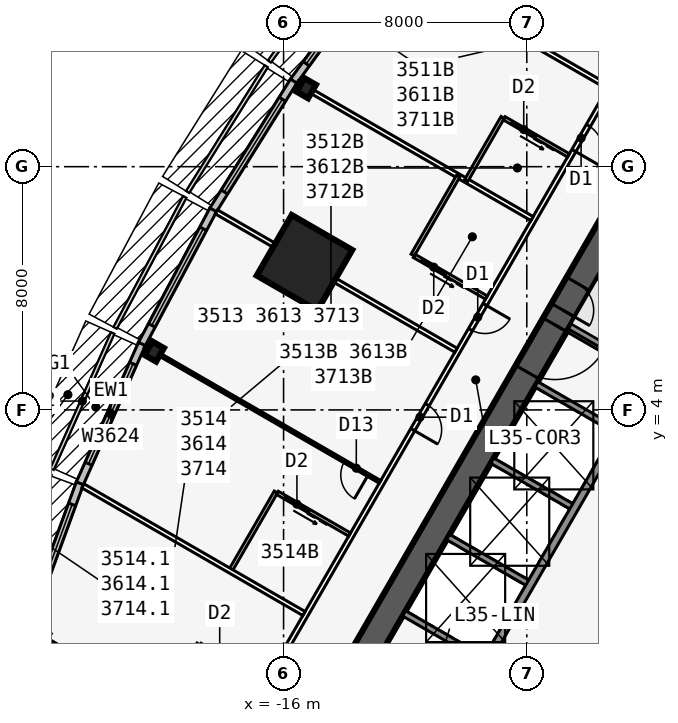
"""IFC4 building model, lengths in metres.
Left out: names, types, materials, properties, quantities, classifications, styles, units other than length and angle.
Written with IfcOpenShell. Run it as: python <this file> out.ifc"""

import sys

from ifc_helpers import new_model, si_unit, direction, frame, frame_2d, origin, origin_2d, place, context, subcontext, project, spatial, rectangle, i_section, extrude, element, fill, save


model = new_model("IFC4")
c1 = context("Model", 3, precision=1e-05, world=origin(), true_north=direction((0.0, 1.0)))
c2 = subcontext(c1, "Body", "Model", "MODEL_VIEW")
j1 = project(units=[si_unit("LENGTHUNIT", "METRE"), si_unit("PLANEANGLEUNIT", "RADIAN")], contexts=[c1])
p1 = place(None, origin())
s1 = spatial("IfcSite", under=j1, at=p1, CompositionType="ELEMENT")
p2 = place(p1, origin())
s2 = spatial("IfcBuilding", under=s1, at=p2, CompositionType="ELEMENT")
p3 = place(p2, frame((0.0, 0.0, 135.1)))
s3 = spatial("IfcBuildingStorey", under=s2, at=p3, CompositionType="ELEMENT", Elevation=135.1)
p4 = place(p3, frame((0.0, 19.052, 0.0), z_axis=(0.0, 0.0, 1.0), x_axis=(-0.499999749417, -0.866025548458, 0.0)))
e1 = element("IfcWall", 1, at=p4, inside=s3, PredefinedType="SHEAR", context=c2, shape_type="SweptSolid", body=[
    extrude(rectangle(XDim=33.0, YDim=0.9, at=frame_2d((16.5, 0.0))), origin(), (0.0, 0.0, 1.0), 3.4),
])
p5 = place(p4, frame((14.15, 0.0, 0.0)))
e2 = element("IfcOpeningElement", 2, at=p5, cuts=e1, PredefinedType="OPENING", context=c2, shape_type="SweptSolid", body=[
    extrude(rectangle(XDim=1.8, YDim=2.13, at=frame_2d((0.9, 1.065))), frame((0.0, 0.46, 0.0), z_axis=(0.0, -1.0, 0.0), x_axis=(1.0, 0.0, 0.0)), (0.0, 0.0, 1.0), 0.92),
])
p6 = place(p4, frame((12.6, 0.0, 0.0)))
e3 = element("IfcOpeningElement", 3, at=p6, cuts=e1, PredefinedType="OPENING", context=c2, shape_type="SweptSolid", body=[
    extrude(rectangle(XDim=1.0, YDim=2.13, at=frame_2d((0.5, 1.065))), frame((0.0, 0.46, 0.0), z_axis=(0.0, -1.0, 0.0), x_axis=(1.0, 0.0, 0.0)), (0.0, 0.0, 1.0), 0.92),
])
p7 = place(p3, frame((-4.929, 3.365, 0.0), z_axis=(0.0, 0.0, 1.0), x_axis=(-0.499991433582, -0.866030349552, 0.0)))
e4 = element("IfcWall", 4, at=p7, inside=s3, PredefinedType="SOLIDWALL", context=c2, shape_type="SweptSolid", body=[
    extrude(rectangle(XDim=10.633, YDim=0.25, at=frame_2d((5.316, 0.0))), origin(), (0.0, 0.0, 1.0), 3.235),
])
p8 = place(p7, frame((9.164, 0.0, 0.0)))
e5 = element("IfcOpeningElement", 5, at=p8, cuts=e4, PredefinedType="OPENING", context=c2, shape_type="SweptSolid", body=[
    extrude(rectangle(XDim=0.9, YDim=2.13, at=frame_2d((0.45, 1.065))), frame((0.0, 0.135, 0.0), z_axis=(0.0, -1.0, 0.0), x_axis=(1.0, 0.0, 0.0)), (0.0, 0.0, 1.0), 0.27),
])
for number, where, z_axis, x_axis in (
    (6, (-3.879, 5.184, 0.0), (0.0, 0.0, 1.0), (-0.866, 0.5, 0.0)),
    (7, (-4.979, 3.279, 0.0), (0.0, 0.0, 1.0), (-0.866, 0.5, 0.0)),
    (8, (-6.429, 0.767, 0.0), (0.0, 0.0, 1.0), (-0.866, 0.5, 0.0)),
    (9, (-7.879, -1.744, 0.0), (0.0, 0.0, 1.0), (-0.866, 0.5, 0.0)),
    (10, (-9.329, -4.256, 0.0), (0.0, 0.0, 1.0), (-0.866, 0.5, 0.0)),
):
    element("IfcWall", number, at=place(p3, frame(where, z_axis=z_axis, x_axis=x_axis)), inside=s3, PredefinedType="SOLIDWALL", context=c2, shape_type="SweptSolid", body=[
        extrude(rectangle(XDim=3.125, YDim=0.2, at=frame_2d((1.562, 0.0))), origin(), (0.0, 0.0, 1.0), 3.235),
    ])
for number, where, z_axis, x_axis in (
    (11, (-15.254, 14.58, 0.0), (0.0, 0.0, 1.0), (-0.866, 0.5, 0.0)),
    (12, (-20.254, 5.92, 0.0), (0.0, 0.0, 1.0), (-0.866, 0.5, 0.0)),
):
    element("IfcColumn", number, at=place(p3, frame(where, z_axis=z_axis, x_axis=x_axis)), inside=s3, PredefinedType="COLUMN", context=c2, shape_type="SweptSolid", body=[
        extrude(i_section(OverallWidth=0.437, OverallDepth=0.513, WebThickness=0.061, FlangeThickness=0.097, at=origin_2d()), origin(), (0.0, 0.0, 1.0), 3.4),
    ])
p9 = place(p3, frame((-15.312, 8.84, 0.0), z_axis=(0.0, 0.0, 1.0), x_axis=(-0.866025403784, 0.5, 0.0)))
e13 = element("IfcColumn", 13, at=p9, inside=s3, PredefinedType="COLUMN", context=c2, shape_type="SweptSolid", body=[
    extrude(rectangle(XDim=2.3, YDim=2.3, at=origin_2d()), origin(), (0.0, 0.0, 1.0), 3.4),
])
p10 = place(p3, frame((-12.718, 18.875, 0.0), z_axis=(0.0, 0.0, 1.0), x_axis=(-0.587669188412, -0.809101307001, 0.0)))
e14 = element("IfcWall", 14, at=p10, inside=s3, PredefinedType="STANDARD", context=c2, shape_type="SweptSolid", body=[
    extrude(rectangle(XDim=5.028, YDim=0.25, at=frame_2d((2.514, 0.0))), origin(), (0.0, 0.0, 1.0), 3.235),
])
p11 = place(p10, frame((0.714, 0.0, 0.45)))
e15 = element("IfcOpeningElement", 15, at=p11, cuts=e14, PredefinedType="OPENING", context=c2, shape_type="SweptSolid", body=[
    extrude(rectangle(XDim=3.6, YDim=2.4, at=frame_2d((1.8, 1.2))), frame((0.0, 0.135, 0.0), z_axis=(0.0, -1.0, 0.0), x_axis=(1.0, 0.0, 0.0)), (0.0, 0.0, 1.0), 0.27),
])
p12 = place(p3, frame((-15.667, 14.814, 0.0), z_axis=(0.0, 0.0, 1.0), x_axis=(-0.529990167382, -0.84800378683, 0.0)))
e16 = element("IfcWall", 16, at=p12, inside=s3, PredefinedType="STANDARD", context=c2, shape_type="SweptSolid", body=[
    extrude(rectangle(XDim=5.003, YDim=0.25, at=frame_2d((2.501, 0.0))), origin(), (0.0, 0.0, 1.0), 3.235),
])
p13 = place(p12, frame((0.701, 0.0, 0.45)))
e17 = element("IfcOpeningElement", 17, at=p13, cuts=e16, PredefinedType="OPENING", context=c2, shape_type="SweptSolid", body=[
    extrude(rectangle(XDim=3.6, YDim=2.4, at=frame_2d((1.8, 1.2))), frame((0.0, 0.135, 0.0), z_axis=(0.0, -1.0, 0.0), x_axis=(1.0, 0.0, 0.0)), (0.0, 0.0, 1.0), 0.27),
])
p14 = place(p3, frame((-18.314, 10.579, 0.0), z_axis=(0.0, 0.0, 1.0), x_axis=(-0.469404966864, -0.882982999317, 0.0)))
e18 = element("IfcWall", 18, at=p14, inside=s3, PredefinedType="STANDARD", context=c2, shape_type="SweptSolid", body=[
    extrude(rectangle(XDim=5.003, YDim=0.25, at=frame_2d((2.501, 0.0))), origin(), (0.0, 0.0, 1.0), 3.235),
])
p15 = place(p14, frame((0.701, 0.0, 0.45)))
e19 = element("IfcOpeningElement", 19, at=p15, cuts=e18, PredefinedType="OPENING", context=c2, shape_type="SweptSolid", body=[
    extrude(rectangle(XDim=3.6, YDim=2.4, at=frame_2d((1.8, 1.2))), frame((0.0, 0.135, 0.0), z_axis=(0.0, -1.0, 0.0), x_axis=(1.0, 0.0, 0.0)), (0.0, 0.0, 1.0), 0.27),
])
p16 = place(p3, frame((-20.659, 6.169, 0.0), z_axis=(0.0, 0.0, 1.0), x_axis=(-0.406832200364, -0.913502906808, 0.0)))
e20 = element("IfcWall", 20, at=p16, inside=s3, PredefinedType="STANDARD", context=c2, shape_type="SweptSolid", body=[
    extrude(rectangle(XDim=5.028, YDim=0.25, at=frame_2d((2.514, 0.0))), origin(), (0.0, 0.0, 1.0), 3.235),
])
p17 = place(p16, frame((0.714, 0.0, 0.45)))
e21 = element("IfcOpeningElement", 21, at=p17, cuts=e20, PredefinedType="OPENING", context=c2, shape_type="SweptSolid", body=[
    extrude(rectangle(XDim=3.6, YDim=2.4, at=frame_2d((1.8, 1.2))), frame((0.0, 0.135, 0.0), z_axis=(0.0, -1.0, 0.0), x_axis=(1.0, 0.0, 0.0)), (0.0, 0.0, 1.0), 0.27),
])
p18 = place(p3, frame((-22.701, 1.584, 0.0), z_axis=(0.0, 0.0, 1.0), x_axis=(-0.343225593282, -0.939252996863, 0.0)))
e22 = element("IfcWall", 22, at=p18, inside=s3, PredefinedType="STANDARD", context=c2, shape_type="SweptSolid", body=[
    extrude(rectangle(XDim=5.076, YDim=0.25, at=frame_2d((2.538, 0.0))), origin(), (0.0, 0.0, 1.0), 3.235),
])
p19 = place(p18, frame((0.738, 0.0, 0.45)))
e23 = element("IfcOpeningElement", 23, at=p19, cuts=e22, PredefinedType="OPENING", context=c2, shape_type="SweptSolid", body=[
    extrude(rectangle(XDim=3.6, YDim=2.4, at=frame_2d((1.8, 1.2))), frame((0.0, 0.135, 0.0), z_axis=(0.0, -1.0, 0.0), x_axis=(1.0, 0.0, 0.0)), (0.0, 0.0, 1.0), 0.27),
])
p20 = place(p3, frame((-0.5, 22.836, 0.0), z_axis=(0.0, 0.0, 1.0), x_axis=(-0.500001677587, -0.866024435227, 0.0)))
e24 = element("IfcWall", 24, at=p20, inside=s3, PredefinedType="PARTITIONING", context=c2, shape_type="SweptSolid", body=[
    extrude(rectangle(XDim=39.054, YDim=0.15, at=frame_2d((19.527, 0.0))), origin(), (0.0, 0.0, 1.0), 3.235),
])
p21 = place(p20, frame((1.558, 0.0, 0.0)))
e25 = element("IfcOpeningElement", 25, at=p21, cuts=e24, PredefinedType="OPENING", context=c2, shape_type="SweptSolid", body=[
    extrude(rectangle(XDim=0.95, YDim=2.13, at=frame_2d((0.475, 1.065))), frame((0.0, 0.085, 0.0), z_axis=(0.0, -1.0, 0.0), x_axis=(1.0, 0.0, 0.0)), (0.0, 0.0, 1.0), 0.17),
])
p22 = place(p20, frame((10.952, 0.0, 0.0)))
e26 = element("IfcOpeningElement", 26, at=p22, cuts=e24, PredefinedType="OPENING", context=c2, shape_type="SweptSolid", body=[
    extrude(rectangle(XDim=0.95, YDim=2.13, at=frame_2d((0.475, 1.065))), frame((0.0, 0.085, 0.0), z_axis=(0.0, -1.0, 0.0), x_axis=(1.0, 0.0, 0.0)), (0.0, 0.0, 1.0), 0.17),
])
p23 = place(p20, frame((17.752, 0.0, 0.0)))
e27 = element("IfcOpeningElement", 27, at=p23, cuts=e24, PredefinedType="OPENING", context=c2, shape_type="SweptSolid", body=[
    extrude(rectangle(XDim=0.95, YDim=2.13, at=frame_2d((0.475, 1.065))), frame((0.0, 0.085, 0.0), z_axis=(0.0, -1.0, 0.0), x_axis=(1.0, 0.0, 0.0)), (0.0, 0.0, 1.0), 0.17),
])
p24 = place(p20, frame((21.552, 0.0, 0.0)))
e28 = element("IfcOpeningElement", 28, at=p24, cuts=e24, PredefinedType="OPENING", context=c2, shape_type="SweptSolid", body=[
    extrude(rectangle(XDim=0.95, YDim=2.13, at=frame_2d((0.475, 1.065))), frame((0.0, 0.085, 0.0), z_axis=(0.0, -1.0, 0.0), x_axis=(1.0, 0.0, 0.0)), (0.0, 0.0, 1.0), 0.17),
])
p25 = place(p20, frame((30.952, 0.0, 0.0)))
e29 = element("IfcOpeningElement", 29, at=p25, cuts=e24, PredefinedType="OPENING", context=c2, shape_type="SweptSolid", body=[
    extrude(rectangle(XDim=0.95, YDim=2.13, at=frame_2d((0.475, 1.065))), frame((0.0, 0.085, 0.0), z_axis=(0.0, -1.0, 0.0), x_axis=(1.0, 0.0, 0.0)), (0.0, 0.0, 1.0), 0.17),
])
p26 = place(p20, frame((37.752, 0.0, 0.0)))
e30 = element("IfcOpeningElement", 30, at=p26, cuts=e24, PredefinedType="OPENING", context=c2, shape_type="SweptSolid", body=[
    extrude(rectangle(XDim=0.95, YDim=2.13, at=frame_2d((0.475, 1.065))), frame((0.0, 0.085, 0.0), z_axis=(0.0, -1.0, 0.0), x_axis=(1.0, 0.0, 0.0)), (0.0, 0.0, 1.0), 0.17),
])
p27 = place(p3, frame((-5.329, 14.623, 0.0), z_axis=(0.0, 0.0, 1.0), x_axis=(-0.866011723728, 0.500023693804, 0.0)))
e31 = element("IfcWall", 31, at=p27, inside=s3, PredefinedType="PARTITIONING", context=c2, shape_type="SweptSolid", body=[
    extrude(rectangle(XDim=8.395, YDim=0.15, at=frame_2d((4.198, 0.0))), origin(), (0.0, 0.0, 1.0), 2.389),
])
p28 = place(p3, frame((-7.829, 10.293, 0.0), z_axis=(0.0, 0.0, 1.0), x_axis=(-0.866027015393, 0.499997208602, 0.0)))
e32 = element("IfcWall", 32, at=p28, inside=s3, PredefinedType="PARTITIONING", context=c2, shape_type="SweptSolid", body=[
    extrude(rectangle(XDim=8.922, YDim=0.15, at=frame_2d((4.461, 0.0))), origin(), (0.0, 0.0, 1.0), 2.389),
])
p29 = place(p3, frame((-10.329, 5.963, 0.0), z_axis=(0.0, 0.0, 1.0), x_axis=(-0.866025170687, 0.500000403736, 0.0)))
e33 = element("IfcWall", 33, at=p29, inside=s3, PredefinedType="PARTITIONING", context=c2, shape_type="SweptSolid", body=[
    extrude(rectangle(XDim=9.099, YDim=0.15, at=frame_2d((4.549, 0.0))), origin(), (0.0, 0.0, 1.0), 2.389),
])
p30 = place(p3, frame((-12.829, 1.633, 0.0), z_axis=(0.0, 0.0, 1.0), x_axis=(-0.866027015393, 0.499997208602, 0.0)))
e34 = element("IfcWall", 34, at=p30, inside=s3, PredefinedType="PARTITIONING", context=c2, shape_type="SweptSolid", body=[
    extrude(rectangle(XDim=8.922, YDim=0.1, at=frame_2d((4.461, 0.0))), origin(), (0.0, 0.0, 1.0), 2.389),
])
p31 = place(p30, frame((0.45, 0.0, 0.0)))
e35 = element("IfcOpeningElement", 35, at=p31, cuts=e34, PredefinedType="OPENING", context=c2, shape_type="SweptSolid", body=[
    extrude(rectangle(XDim=0.9, YDim=2.13, at=frame_2d((0.45, 1.065))), frame((0.0, 0.06, 0.0), z_axis=(0.0, -1.0, 0.0), x_axis=(1.0, 0.0, 0.0)), (0.0, 0.0, 1.0), 0.12),
])
p32 = place(p3, frame((-15.329, -2.697, 0.0), z_axis=(0.0, 0.0, 1.0), x_axis=(-0.866024316602, 0.50000188305, 0.0)))
e36 = element("IfcWall", 36, at=p32, inside=s3, PredefinedType="PARTITIONING", context=c2, shape_type="SweptSolid", body=[
    extrude(rectangle(XDim=8.395, YDim=0.15, at=frame_2d((4.198, 0.0))), origin(), (0.0, 0.0, 1.0), 2.389),
])
p33 = place(p3, frame((-17.829, -7.027, 0.0), z_axis=(0.0, 0.0, 1.0), x_axis=(-0.866029804378, 0.499992377871, 0.0)))
e37 = element("IfcWall", 37, at=p33, inside=s3, PredefinedType="PARTITIONING", context=c2, shape_type="SweptSolid", body=[
    extrude(rectangle(XDim=7.516, YDim=0.15, at=frame_2d((3.758, 0.0))), origin(), (0.0, 0.0, 1.0), 2.389),
])
p34 = place(p3, frame((-8.793, 13.622, 0.0), z_axis=(0.0, 0.0, 1.0), x_axis=(-0.500001309137, -0.866024647952, 0.0)))
e38 = element("IfcWall", 38, at=p34, inside=s3, PredefinedType="PLUMBINGWALL", context=c2, shape_type="SweptSolid", body=[
    extrude(rectangle(XDim=2.4, YDim=0.12, at=frame_2d((1.2, 0.0))), origin(), (0.0, 0.0, 1.0), 3.235),
])
p35 = place(p3, frame((-6.628, 12.372, 0.0), z_axis=(0.0, 0.0, 1.0), x_axis=(-0.866005645448, 0.500034220881, 0.0)))
e39 = element("IfcWall", 39, at=p35, inside=s3, PredefinedType="PLUMBINGWALL", context=c2, shape_type="SweptSolid", body=[
    extrude(rectangle(XDim=2.44, YDim=0.12, at=frame_2d((1.22, 0.0))), origin(), (0.0, 0.0, 1.0), 3.235),
])
p36 = place(p35, frame((1.25, 0.0, 0.0)))
e40 = element("IfcOpeningElement", 40, at=p36, cuts=e39, PredefinedType="OPENING", context=c2, shape_type="SweptSolid", body=[
    extrude(rectangle(XDim=0.9, YDim=2.13, at=frame_2d((0.45, 1.065))), frame((0.0, 0.07, 0.0), z_axis=(0.0, -1.0, 0.0), x_axis=(1.0, 0.0, 0.0)), (0.0, 0.0, 1.0), 0.14),
])
p37 = place(p3, frame((-10.253, 11.693, 0.0), z_axis=(0.0, 0.0, 1.0), x_axis=(-0.499990139034, -0.866031096941, 0.0)))
e41 = element("IfcWall", 41, at=p37, inside=s3, PredefinedType="PLUMBINGWALL", context=c2, shape_type="SweptSolid", body=[
    extrude(rectangle(XDim=3.0, YDim=0.12, at=frame_2d((1.5, 0.0))), origin(), (0.0, 0.0, 1.0), 3.235),
])
p38 = place(p3, frame((-9.329, 7.695, 0.0), z_axis=(0.0, 0.0, 1.0), x_axis=(-0.866035715982, 0.499982138324, 0.0)))
e42 = element("IfcWall", 42, at=p38, inside=s3, PredefinedType="PLUMBINGWALL", context=c2, shape_type="SweptSolid", body=[
    extrude(rectangle(XDim=2.74, YDim=0.12, at=frame_2d((1.37, 0.0))), origin(), (0.0, 0.0, 1.0), 3.235),
])
p39 = place(p38, frame((1.55, 0.0, 0.0)))
e43 = element("IfcOpeningElement", 43, at=p39, cuts=e42, PredefinedType="OPENING", context=c2, shape_type="SweptSolid", body=[
    extrude(rectangle(XDim=0.9, YDim=2.13, at=frame_2d((0.45, 1.065))), frame((0.0, 0.07, 0.0), z_axis=(0.0, -1.0, 0.0), x_axis=(1.0, 0.0, 0.0)), (0.0, 0.0, 1.0), 0.14),
])
p40 = place(p3, frame((-16.253, 1.301, 0.0), z_axis=(0.0, 0.0, 1.0), x_axis=(-0.499990139034, -0.866031096941, 0.0)))
e44 = element("IfcWall", 44, at=p40, inside=s3, PredefinedType="PLUMBINGWALL", context=c2, shape_type="SweptSolid", body=[
    extrude(rectangle(XDim=3.0, YDim=0.12, at=frame_2d((1.5, 0.0))), origin(), (0.0, 0.0, 1.0), 3.235),
])
p41 = place(p3, frame((-13.829, -0.099, 0.0), z_axis=(0.0, 0.0, 1.0), x_axis=(-0.865997131366, 0.500048966069, 0.0)))
e45 = element("IfcWall", 45, at=p41, inside=s3, PredefinedType="PLUMBINGWALL", context=c2, shape_type="SweptSolid", body=[
    extrude(rectangle(XDim=2.74, YDim=0.12, at=frame_2d((1.37, 0.0))), origin(), (0.0, 0.0, 1.0), 3.235),
])
p42 = place(p41, frame((1.55, 0.0, 0.0)))
e46 = element("IfcOpeningElement", 46, at=p42, cuts=e45, PredefinedType="OPENING", context=c2, shape_type="SweptSolid", body=[
    extrude(rectangle(XDim=0.9, YDim=2.13, at=frame_2d((0.45, 1.065))), frame((0.0, 0.07, 0.0), z_axis=(0.0, -1.0, 0.0), x_axis=(1.0, 0.0, 0.0)), (0.0, 0.0, 1.0), 0.14),
])
p43 = place(p3, frame((-18.793, -3.699, 0.0), z_axis=(0.0, 0.0, 1.0), x_axis=(-0.500001309137, -0.866024647952, 0.0)))
e47 = element("IfcWall", 47, at=p43, inside=s3, PredefinedType="PLUMBINGWALL", context=c2, shape_type="SweptSolid", body=[
    extrude(rectangle(XDim=2.4, YDim=0.12, at=frame_2d((1.2, 0.0))), origin(), (0.0, 0.0, 1.0), 3.235),
])
p44 = place(p3, frame((-16.628, -4.949, 0.0), z_axis=(0.0, 0.0, 1.0), x_axis=(-0.866048967903, 0.499959183527, 0.0)))
e48 = element("IfcWall", 48, at=p44, inside=s3, PredefinedType="PLUMBINGWALL", context=c2, shape_type="SweptSolid", body=[
    extrude(rectangle(XDim=2.44, YDim=0.12, at=frame_2d((1.22, 0.0))), origin(), (0.0, 0.0, 1.0), 3.235),
])
p45 = place(p44, frame((1.25, 0.0, 0.0)))
e49 = element("IfcOpeningElement", 49, at=p45, cuts=e48, PredefinedType="OPENING", context=c2, shape_type="SweptSolid", body=[
    extrude(rectangle(XDim=0.9, YDim=2.13, at=frame_2d((0.45, 1.065))), frame((0.0, 0.07, 0.0), z_axis=(0.0, -1.0, 0.0), x_axis=(1.0, 0.0, 0.0)), (0.0, 0.0, 1.0), 0.14),
])
p46 = place(p11, origin())
e50 = element("IfcWindow", 50, at=p46, inside=s3, PartitioningType="SINGLE_PANEL", PredefinedType="WINDOW", context=c2, shape_type="SweptSolid", body=[
    extrude(rectangle(XDim=3.6, YDim=2.4, at=frame_2d((1.8, 1.2))), frame((0.0, 0.03, 0.0), z_axis=(0.0, -1.0, 0.0), x_axis=(1.0, 0.0, 0.0)), (0.0, 0.0, 1.0), 0.06),
])
fill(e15, e50)
p47 = place(p13, origin())
e51 = element("IfcWindow", 51, at=p47, inside=s3, PartitioningType="SINGLE_PANEL", PredefinedType="WINDOW", context=c2, shape_type="SweptSolid", body=[
    extrude(rectangle(XDim=3.6, YDim=2.4, at=frame_2d((1.8, 1.2))), frame((0.0, 0.03, 0.0), z_axis=(0.0, -1.0, 0.0), x_axis=(1.0, 0.0, 0.0)), (0.0, 0.0, 1.0), 0.06),
])
fill(e17, e51)
p48 = place(p15, origin())
e52 = element("IfcWindow", 52, at=p48, inside=s3, PartitioningType="SINGLE_PANEL", PredefinedType="WINDOW", context=c2, shape_type="SweptSolid", body=[
    extrude(rectangle(XDim=3.6, YDim=2.4, at=frame_2d((1.8, 1.2))), frame((0.0, 0.03, 0.0), z_axis=(0.0, -1.0, 0.0), x_axis=(1.0, 0.0, 0.0)), (0.0, 0.0, 1.0), 0.06),
])
fill(e19, e52)
p49 = place(p17, origin())
e53 = element("IfcWindow", 53, at=p49, inside=s3, PartitioningType="SINGLE_PANEL", PredefinedType="WINDOW", context=c2, shape_type="SweptSolid", body=[
    extrude(rectangle(XDim=3.6, YDim=2.4, at=frame_2d((1.8, 1.2))), frame((0.0, 0.03, 0.0), z_axis=(0.0, -1.0, 0.0), x_axis=(1.0, 0.0, 0.0)), (0.0, 0.0, 1.0), 0.06),
])
fill(e21, e53)
p50 = place(p19, origin())
e54 = element("IfcWindow", 54, at=p50, inside=s3, PartitioningType="SINGLE_PANEL", PredefinedType="WINDOW", context=c2, shape_type="SweptSolid", body=[
    extrude(rectangle(XDim=3.6, YDim=2.4, at=frame_2d((1.8, 1.2))), frame((0.0, 0.03, 0.0), z_axis=(0.0, -1.0, 0.0), x_axis=(1.0, 0.0, 0.0)), (0.0, 0.0, 1.0), 0.06),
])
fill(e23, e54)
p51 = place(p31, origin())
e55 = element("IfcDoor", 55, at=p51, inside=s3, OperationType="SINGLE_SWING_LEFT", PredefinedType="DOOR", context=c2, shape_type="SweptSolid", body=[
    extrude(rectangle(XDim=0.9, YDim=2.13, at=frame_2d((0.45, 1.065))), frame((0.0, 0.025, 0.0), z_axis=(0.0, -1.0, 0.0), x_axis=(1.0, 0.0, 0.0)), (0.0, 0.0, 1.0), 0.05),
])
fill(e35, e55)
p52 = place(p36, origin())
e56 = element("IfcDoor", 56, at=p52, inside=s3, OperationType="SLIDING_TO_LEFT", PredefinedType="DOOR", context=c2, shape_type="SweptSolid", body=[
    extrude(rectangle(XDim=0.9, YDim=2.13, at=frame_2d((0.45, 1.065))), frame((0.0, 0.025, 0.0), z_axis=(0.0, -1.0, 0.0), x_axis=(1.0, 0.0, 0.0)), (0.0, 0.0, 1.0), 0.05),
])
fill(e40, e56)
p53 = place(p22, origin())
e57 = element("IfcDoor", 57, at=p53, inside=s3, OperationType="SINGLE_SWING_RIGHT", PredefinedType="DOOR", context=c2, shape_type="SweptSolid", body=[
    extrude(rectangle(XDim=0.95, YDim=2.13, at=frame_2d((0.475, 1.065))), frame((0.0, 0.025, 0.0), z_axis=(0.0, -1.0, 0.0), x_axis=(1.0, 0.0, 0.0)), (0.0, 0.0, 1.0), 0.05),
])
fill(e26, e57)
p54 = place(p39, origin())
e58 = element("IfcDoor", 58, at=p54, inside=s3, OperationType="SLIDING_TO_LEFT", PredefinedType="DOOR", context=c2, shape_type="SweptSolid", body=[
    extrude(rectangle(XDim=0.9, YDim=2.13, at=frame_2d((0.45, 1.065))), frame((0.0, 0.025, 0.0), z_axis=(0.0, -1.0, 0.0), x_axis=(1.0, 0.0, 0.0)), (0.0, 0.0, 1.0), 0.05),
])
fill(e43, e58)
p55 = place(p23, origin())
e59 = element("IfcDoor", 59, at=p55, inside=s3, OperationType="SINGLE_SWING_LEFT", PredefinedType="DOOR", context=c2, shape_type="SweptSolid", body=[
    extrude(rectangle(XDim=0.95, YDim=2.13, at=frame_2d((0.475, 1.065))), frame((0.0, 0.025, 0.0), z_axis=(0.0, -1.0, 0.0), x_axis=(1.0, 0.0, 0.0)), (0.0, 0.0, 1.0), 0.05),
])
fill(e27, e59)
p56 = place(p24, origin())
e60 = element("IfcDoor", 60, at=p56, inside=s3, OperationType="SINGLE_SWING_RIGHT", PredefinedType="DOOR", context=c2, shape_type="SweptSolid", body=[
    extrude(rectangle(XDim=0.95, YDim=2.13, at=frame_2d((0.475, 1.065))), frame((0.0, 0.025, 0.0), z_axis=(0.0, -1.0, 0.0), x_axis=(1.0, 0.0, 0.0)), (0.0, 0.0, 1.0), 0.05),
])
fill(e28, e60)
p57 = place(p42, origin())
e61 = element("IfcDoor", 61, at=p57, inside=s3, OperationType="SLIDING_TO_LEFT", PredefinedType="DOOR", context=c2, shape_type="SweptSolid", body=[
    extrude(rectangle(XDim=0.9, YDim=2.13, at=frame_2d((0.45, 1.065))), frame((0.0, 0.025, 0.0), z_axis=(0.0, -1.0, 0.0), x_axis=(1.0, 0.0, 0.0)), (0.0, 0.0, 1.0), 0.05),
])
fill(e46, e61)
p58 = place(p5, origin())
e62 = element("IfcDoor", 62, at=p58, inside=s3, OperationType="DOUBLE_DOOR_SINGLE_SWING", PredefinedType="DOOR", context=c2, shape_type="SweptSolid", body=[
    extrude(rectangle(XDim=1.8, YDim=2.13, at=frame_2d((0.9, 1.065))), frame((0.0, 0.025, 0.0), z_axis=(0.0, -1.0, 0.0), x_axis=(1.0, 0.0, 0.0)), (0.0, 0.0, 1.0), 0.05),
])
fill(e2, e62)
p59 = place(p6, origin())
e63 = element("IfcDoor", 63, at=p59, inside=s3, OperationType="SINGLE_SWING_RIGHT", PredefinedType="DOOR", context=c2, shape_type="SweptSolid", body=[
    extrude(rectangle(XDim=1.0, YDim=2.13, at=frame_2d((0.5, 1.065))), frame((0.0, 0.025, 0.0), z_axis=(0.0, -1.0, 0.0), x_axis=(1.0, 0.0, 0.0)), (0.0, 0.0, 1.0), 0.05),
])
fill(e3, e63)
save(model, sys.argv[1])
